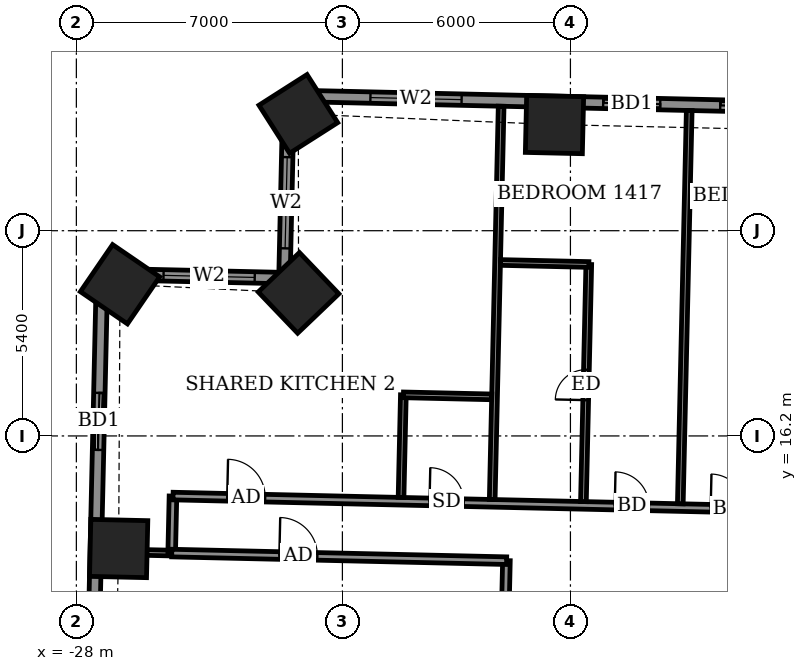
"""IFC4 building model, lengths in metres.
Left out: names, types, materials, properties, quantities, classifications, styles, units other than length and angle.
Written with IfcOpenShell. Run it as: python <this file> out.ifc"""

import sys

from ifc_helpers import new_model, si_unit, direction, frame, frame_2d, origin, origin_2d, place, context, subcontext, project, spatial, rectangle, extrude, element, fill, save


model = new_model("IFC4")
c1 = context("Model", 3, precision=1e-05, world=origin(), true_north=direction((0.0, 1.0)))
c2 = subcontext(c1, "Body", "Model", "MODEL_VIEW")
j1 = project(units=[si_unit("LENGTHUNIT", "METRE"), si_unit("PLANEANGLEUNIT", "RADIAN")], contexts=[c1])
p1 = place(None, origin())
s1 = spatial("IfcSite", under=j1, at=p1, CompositionType="ELEMENT")
p2 = place(p1, origin())
s2 = spatial("IfcBuilding", under=s1, at=p2, CompositionType="ELEMENT")
p3 = place(p2, frame((0.0, 0.0, 60.3)))
s3 = spatial("IfcBuildingStorey", under=s2, at=p3, CompositionType="ELEMENT", Elevation=60.3)
for number, where, z_axis, x_axis in (
    (1, (-15.419, 24.393, -0.55), (0.0, 0.0, 1.0), (-1.0, 0.023, 0.0)),
    (2, (-22.16, 24.673, -0.55), (0.0, 0.0, 1.0), (-0.843, -0.538, 0.0)),
    (3, (-22.154, 19.964, -0.55), (0.0, 0.0, 1.0), (-0.723, -0.691, 0.0)),
    (4, (-26.851, 20.191, -0.55), (0.0, 0.0, 1.0), (-0.565, -0.825, 0.0)),
    (5, (-26.887, 13.238, -0.55), (0.0, 0.0, 1.0), (-0.023, -1.0, 0.0)),
):
    element("IfcColumn", number, at=place(p3, frame(where, z_axis=z_axis, x_axis=x_axis)), inside=s3, PredefinedType="COLUMN", context=c2, shape_type="SweptSolid", body=[
        extrude(rectangle(XDim=1.5, YDim=1.5, at=origin_2d()), origin(), (0.0, 0.0, 1.0), 3.6),
    ])
p4 = place(p3, frame((27.407, 24.021, 0.0), z_axis=(0.0, 0.0, 1.0), x_axis=(-0.99974239923, 0.022696589664, 0.0)))
e6 = element("IfcWall", 6, at=p4, inside=s3, PredefinedType="SOLIDWALL", context=c2, shape_type="SweptSolid", body=[
    extrude(rectangle(XDim=49.836, YDim=0.3, at=frame_2d((24.918, 0.0))), origin(), (0.0, 0.0, 1.0), 3.05),
])
p5 = place(p4, frame((2.871, 0.0, 0.0)))
e7 = element("IfcOpeningElement", 7, at=p5, cuts=e6, PredefinedType="OPENING", context=c2, shape_type="SweptSolid", body=[
    extrude(rectangle(XDim=1.5, YDim=2.4, at=frame_2d((0.75, 1.2))), frame((0.0, 0.16, 0.0), z_axis=(0.0, -1.0, 0.0), x_axis=(1.0, 0.0, 0.0)), (0.0, 0.0, 1.0), 0.32),
])
p6 = place(p4, frame((8.349, 0.0, 0.0)))
e8 = element("IfcOpeningElement", 8, at=p6, cuts=e6, PredefinedType="OPENING", context=c2, shape_type="SweptSolid", body=[
    extrude(rectangle(XDim=1.5, YDim=2.4, at=frame_2d((0.75, 1.2))), frame((0.0, 0.16, 0.0), z_axis=(0.0, -1.0, 0.0), x_axis=(1.0, 0.0, 0.0)), (0.0, 0.0, 1.0), 0.32),
])
p7 = place(p4, frame((11.43, 0.0, 0.0)))
e9 = element("IfcOpeningElement", 9, at=p7, cuts=e6, PredefinedType="OPENING", context=c2, shape_type="SweptSolid", body=[
    extrude(rectangle(XDim=1.5, YDim=2.4, at=frame_2d((0.75, 1.2))), frame((0.0, 0.16, 0.0), z_axis=(0.0, -1.0, 0.0), x_axis=(1.0, 0.0, 0.0)), (0.0, 0.0, 1.0), 0.32),
])
p8 = place(p4, frame((17.236, 0.0, 0.0)))
e10 = element("IfcOpeningElement", 10, at=p8, cuts=e6, PredefinedType="OPENING", context=c2, shape_type="SweptSolid", body=[
    extrude(rectangle(XDim=1.5, YDim=2.4, at=frame_2d((0.75, 1.2))), frame((0.0, 0.16, 0.0), z_axis=(0.0, -1.0, 0.0), x_axis=(1.0, 0.0, 0.0)), (0.0, 0.0, 1.0), 0.32),
])
p9 = place(p4, frame((22.686, 0.0, 0.0)))
e11 = element("IfcOpeningElement", 11, at=p9, cuts=e6, PredefinedType="OPENING", context=c2, shape_type="SweptSolid", body=[
    extrude(rectangle(XDim=1.5, YDim=2.4, at=frame_2d((0.75, 1.2))), frame((0.0, 0.16, 0.0), z_axis=(0.0, -1.0, 0.0), x_axis=(1.0, 0.0, 0.0)), (0.0, 0.0, 1.0), 0.32),
])
p10 = place(p4, frame((25.767, 0.0, 0.0)))
e12 = element("IfcOpeningElement", 12, at=p10, cuts=e6, PredefinedType="OPENING", context=c2, shape_type="SweptSolid", body=[
    extrude(rectangle(XDim=1.5, YDim=2.4, at=frame_2d((0.75, 1.2))), frame((0.0, 0.16, 0.0), z_axis=(0.0, -1.0, 0.0), x_axis=(1.0, 0.0, 0.0)), (0.0, 0.0, 1.0), 0.32),
])
p11 = place(p4, frame((31.211, 0.0, 0.0)))
e13 = element("IfcOpeningElement", 13, at=p11, cuts=e6, PredefinedType="OPENING", context=c2, shape_type="SweptSolid", body=[
    extrude(rectangle(XDim=1.5, YDim=2.4, at=frame_2d((0.75, 1.2))), frame((0.0, 0.16, 0.0), z_axis=(0.0, -1.0, 0.0), x_axis=(1.0, 0.0, 0.0)), (0.0, 0.0, 1.0), 0.32),
])
p12 = place(p4, frame((36.974, 0.0, 0.0)))
e14 = element("IfcOpeningElement", 14, at=p12, cuts=e6, PredefinedType="OPENING", context=c2, shape_type="SweptSolid", body=[
    extrude(rectangle(XDim=1.5, YDim=2.4, at=frame_2d((0.75, 1.2))), frame((0.0, 0.16, 0.0), z_axis=(0.0, -1.0, 0.0), x_axis=(1.0, 0.0, 0.0)), (0.0, 0.0, 1.0), 0.32),
])
p13 = place(p4, frame((40.055, 0.0, 0.0)))
e15 = element("IfcOpeningElement", 15, at=p13, cuts=e6, PredefinedType="OPENING", context=c2, shape_type="SweptSolid", body=[
    extrude(rectangle(XDim=1.5, YDim=2.4, at=frame_2d((0.75, 1.2))), frame((0.0, 0.16, 0.0), z_axis=(0.0, -1.0, 0.0), x_axis=(1.0, 0.0, 0.0)), (0.0, 0.0, 1.0), 0.32),
])
p14 = place(p4, frame((45.282, 0.0, 0.9)))
e16 = element("IfcOpeningElement", 16, at=p14, cuts=e6, PredefinedType="OPENING", context=c2, shape_type="SweptSolid", body=[
    extrude(rectangle(XDim=2.4, YDim=1.5, at=frame_2d((1.2, 0.75))), frame((0.0, 0.16, 0.0), z_axis=(0.0, -1.0, 0.0), x_axis=(1.0, 0.0, 0.0)), (0.0, 0.0, 1.0), 0.32),
])
p15 = place(p3, frame((-22.416, 25.152, 0.0), z_axis=(0.0, 0.0, 1.0), x_axis=(-0.022683280499, -0.999742701292, 0.0)))
e17 = element("IfcWall", 17, at=p15, inside=s3, PredefinedType="SOLIDWALL", context=c2, shape_type="SweptSolid", body=[
    extrude(rectangle(XDim=4.8, YDim=0.3, at=frame_2d((2.4, 0.0))), origin(), (0.0, 0.0, 1.0), 2.55),
])
p16 = place(p15, frame((1.617, 0.0, 0.9)))
e18 = element("IfcOpeningElement", 18, at=p16, cuts=e17, PredefinedType="OPENING", context=c2, shape_type="SweptSolid", body=[
    extrude(rectangle(XDim=2.4, YDim=1.5, at=frame_2d((1.2, 0.75))), frame((0.0, 0.16, 0.0), z_axis=(0.0, -1.0, 0.0), x_axis=(1.0, 0.0, 0.0)), (0.0, 0.0, 1.0), 0.32),
])
p17 = place(p3, frame((-22.525, 20.353, 0.0), z_axis=(0.0, 0.0, 1.0), x_axis=(-0.999742701292, 0.022683280499, 0.0)))
e19 = element("IfcWall", 19, at=p17, inside=s3, PredefinedType="SOLIDWALL", context=c2, shape_type="SweptSolid", body=[
    extrude(rectangle(XDim=4.8, YDim=0.3, at=frame_2d((2.4, 0.0))), origin(), (0.0, 0.0, 1.0), 2.55),
])
p18 = place(p17, frame((0.782, 0.0, 0.9)))
e20 = element("IfcOpeningElement", 20, at=p18, cuts=e19, PredefinedType="OPENING", context=c2, shape_type="SweptSolid", body=[
    extrude(rectangle(XDim=2.4, YDim=1.5, at=frame_2d((1.2, 0.75))), frame((0.0, 0.16, 0.0), z_axis=(0.0, -1.0, 0.0), x_axis=(1.0, 0.0, 0.0)), (0.0, 0.0, 1.0), 0.32),
])
p19 = place(p3, frame((-27.324, 20.462, 0.0), z_axis=(0.0, 0.0, 1.0), x_axis=(-0.022695628174, -0.999742421057, 0.0)))
e21 = element("IfcWall", 21, at=p19, inside=s3, PredefinedType="SOLIDWALL", context=c2, shape_type="SweptSolid", body=[
    extrude(rectangle(XDim=14.63, YDim=0.3, at=frame_2d((7.315, 0.0))), origin(), (0.0, 0.0, 1.0), 3.05),
])
p20 = place(p19, frame((3.13, 0.0, 0.0)))
e22 = element("IfcOpeningElement", 22, at=p20, cuts=e21, PredefinedType="OPENING", context=c2, shape_type="SweptSolid", body=[
    extrude(rectangle(XDim=1.5, YDim=2.4, at=frame_2d((0.75, 1.2))), frame((0.0, 0.16, 0.0), z_axis=(0.0, -1.0, 0.0), x_axis=(1.0, 0.0, 0.0)), (0.0, 0.0, 1.0), 0.32),
])
p21 = place(p19, frame((9.694, 0.0, 0.9)))
e23 = element("IfcOpeningElement", 23, at=p21, cuts=e21, PredefinedType="OPENING", context=c2, shape_type="SweptSolid", body=[
    extrude(rectangle(XDim=2.4, YDim=1.5, at=frame_2d((1.2, 0.75))), frame((0.0, 0.16, 0.0), z_axis=(0.0, -1.0, 0.0), x_axis=(1.0, 0.0, 0.0)), (0.0, 0.0, 1.0), 0.32),
])
p22 = place(p3, frame((-17.287, -13.625, 0.0), z_axis=(0.0, 0.0, 1.0), x_axis=(0.022712214871, 0.999742044377, 0.0)))
e24 = element("IfcWall", 24, at=p22, inside=s3, PredefinedType="PARTITIONING", context=c2, shape_type="SweptSolid", body=[
    extrude(rectangle(XDim=26.551, YDim=0.2, at=frame_2d((13.275, 0.0))), origin(), (0.0, 0.0, 1.0), 3.05),
])
p23 = place(p22, frame((14.15, 0.0, 0.0)))
e25 = element("IfcOpeningElement", 25, at=p23, cuts=e24, PredefinedType="OPENING", context=c2, shape_type="SweptSolid", body=[
    extrude(rectangle(XDim=1.0, YDim=2.1, at=frame_2d((0.5, 1.05))), frame((0.0, 0.11, 0.0), z_axis=(0.0, -1.0, 0.0), x_axis=(1.0, 0.0, 0.0)), (0.0, 0.0, 1.0), 0.22),
])
p24 = place(p22, frame((17.625, 0.0, 0.0)))
e26 = element("IfcOpeningElement", 26, at=p24, cuts=e24, PredefinedType="OPENING", context=c2, shape_type="SweptSolid", body=[
    extrude(rectangle(XDim=0.9, YDim=2.1, at=frame_2d((0.45, 1.05))), frame((0.0, 0.11, 0.0), z_axis=(0.0, -1.0, 0.0), x_axis=(1.0, 0.0, 0.0)), (0.0, 0.0, 1.0), 0.22),
])
p25 = place(p22, frame((9.875, 0.0, 0.0)))
e27 = element("IfcOpeningElement", 27, at=p25, cuts=e24, PredefinedType="OPENING", context=c2, shape_type="SweptSolid", body=[
    extrude(rectangle(XDim=1.0, YDim=2.1, at=frame_2d((0.5, 1.05))), frame((0.0, 0.11, 0.0), z_axis=(0.0, -1.0, 0.0), x_axis=(1.0, 0.0, 0.0)), (0.0, 0.0, 1.0), 0.22),
])
p26 = place(p22, frame((6.475, 0.0, 0.0)))
e28 = element("IfcOpeningElement", 28, at=p26, cuts=e24, PredefinedType="OPENING", context=c2, shape_type="SweptSolid", body=[
    extrude(rectangle(XDim=0.9, YDim=2.1, at=frame_2d((0.45, 1.05))), frame((0.0, 0.11, 0.0), z_axis=(0.0, -1.0, 0.0), x_axis=(1.0, 0.0, 0.0)), (0.0, 0.0, 1.0), 0.22),
])
p27 = place(p22, frame((0.862, 0.0, 0.0)))
e29 = element("IfcOpeningElement", 29, at=p27, cuts=e24, PredefinedType="OPENING", context=c2, shape_type="SweptSolid", body=[
    extrude(rectangle(XDim=1.0, YDim=2.1, at=frame_2d((0.5, 1.05))), frame((0.0, 0.11, 0.0), z_axis=(0.0, -1.0, 0.0), x_axis=(1.0, 0.0, 0.0)), (0.0, 0.0, 1.0), 0.22),
])
p28 = place(p22, frame((3.675, 0.0, 0.0)))
e30 = element("IfcOpeningElement", 30, at=p28, cuts=e24, PredefinedType="OPENING", context=c2, shape_type="SweptSolid", body=[
    extrude(rectangle(XDim=0.9, YDim=2.1, at=frame_2d((0.45, 1.05))), frame((0.0, 0.11, 0.0), z_axis=(0.0, -1.0, 0.0), x_axis=(1.0, 0.0, 0.0)), (0.0, 0.0, 1.0), 0.22),
])
p29 = place(p3, frame((-27.34, 13.16, 0.0), z_axis=(0.0, 0.0, 1.0), x_axis=(0.999743599624, -0.02264365277, 0.0)))
e31 = element("IfcWall", 31, at=p29, inside=s3, PredefinedType="PARTITIONING", context=c2, shape_type="SweptSolid", body=[
    extrude(rectangle(XDim=1.854, YDim=0.15, at=frame_2d((0.927, 0.0))), origin(), (0.0, 0.0, 1.0), 3.05),
])
p30 = place(p3, frame((-25.492, 13.118, 0.0), z_axis=(0.0, 0.0, 1.0), x_axis=(0.022617910375, 0.999744182344, 0.0)))
e32 = element("IfcWall", 32, at=p30, inside=s3, PredefinedType="PARTITIONING", context=c2, shape_type="SweptSolid", body=[
    extrude(rectangle(XDim=1.5, YDim=0.2, at=frame_2d((0.75, 0.0))), origin(), (0.0, 0.0, 1.0), 3.05),
])
p31 = place(p3, frame((-25.49, 13.118, 0.0), z_axis=(0.0, 0.0, 1.0), x_axis=(0.999742607231, -0.02268742575, 0.0)))
e33 = element("IfcWall", 33, at=p31, inside=s3, PredefinedType="PARTITIONING", context=c2, shape_type="SweptSolid", body=[
    extrude(rectangle(XDim=8.813, YDim=0.2, at=frame_2d((4.407, 0.0))), origin(), (0.0, 0.0, 1.0), 3.05),
])
p32 = place(p31, frame((2.832, 0.0, 0.0)))
e34 = element("IfcOpeningElement", 34, at=p32, cuts=e33, PredefinedType="OPENING", context=c2, shape_type="SweptSolid", body=[
    extrude(rectangle(XDim=1.0, YDim=2.1, at=frame_2d((0.5, 1.05))), frame((0.0, 0.11, 0.0), z_axis=(0.0, -1.0, 0.0), x_axis=(1.0, 0.0, 0.0)), (0.0, 0.0, 1.0), 0.22),
])
p33 = place(p3, frame((-25.456, 14.618, 0.0), z_axis=(0.0, 0.0, 1.0), x_axis=(0.999742687583, -0.0226838847, 0.0)))
e35 = element("IfcWall", 35, at=p33, inside=s3, PredefinedType="PARTITIONING", context=c2, shape_type="SweptSolid", body=[
    extrude(rectangle(XDim=54.836, YDim=0.2, at=frame_2d((27.418, 0.0))), origin(), (0.0, 0.0, 1.0), 3.05),
])
p34 = place(p33, frame((52.493, 0.0, 0.0)))
e36 = element("IfcOpeningElement", 36, at=p34, cuts=e35, PredefinedType="OPENING", context=c2, shape_type="SweptSolid", body=[
    extrude(rectangle(XDim=1.0, YDim=2.1, at=frame_2d((0.5, 1.05))), frame((0.0, 0.11, 0.0), z_axis=(0.0, -1.0, 0.0), x_axis=(1.0, 0.0, 0.0)), (0.0, 0.0, 1.0), 0.22),
])
p35 = place(p33, frame((47.25, 0.0, 0.0)))
e37 = element("IfcOpeningElement", 37, at=p35, cuts=e35, PredefinedType="OPENING", context=c2, shape_type="SweptSolid", body=[
    extrude(rectangle(XDim=0.9, YDim=2.1, at=frame_2d((0.45, 1.05))), frame((0.0, 0.11, 0.0), z_axis=(0.0, -1.0, 0.0), x_axis=(1.0, 0.0, 0.0)), (0.0, 0.0, 1.0), 0.22),
])
p36 = place(p33, frame((42.525, 0.0, 0.0)))
e38 = element("IfcOpeningElement", 38, at=p36, cuts=e35, PredefinedType="OPENING", context=c2, shape_type="SweptSolid", body=[
    extrude(rectangle(XDim=0.9, YDim=2.1, at=frame_2d((0.45, 1.05))), frame((0.0, 0.11, 0.0), z_axis=(0.0, -1.0, 0.0), x_axis=(1.0, 0.0, 0.0)), (0.0, 0.0, 1.0), 0.22),
])
p37 = place(p33, frame((40.275, 0.0, 0.0)))
e39 = element("IfcOpeningElement", 39, at=p37, cuts=e35, PredefinedType="OPENING", context=c2, shape_type="SweptSolid", body=[
    extrude(rectangle(XDim=0.9, YDim=2.1, at=frame_2d((0.45, 1.05))), frame((0.0, 0.11, 0.0), z_axis=(0.0, -1.0, 0.0), x_axis=(1.0, 0.0, 0.0)), (0.0, 0.0, 1.0), 0.22),
])
p38 = place(p33, frame((33.0, 0.0, 0.0)))
e40 = element("IfcOpeningElement", 40, at=p38, cuts=e35, PredefinedType="OPENING", context=c2, shape_type="SweptSolid", body=[
    extrude(rectangle(XDim=0.9, YDim=2.1, at=frame_2d((0.45, 1.05))), frame((0.0, 0.11, 0.0), z_axis=(0.0, -1.0, 0.0), x_axis=(1.0, 0.0, 0.0)), (0.0, 0.0, 1.0), 0.22),
])
p39 = place(p33, frame((30.65, 0.0, 0.0)))
e41 = element("IfcOpeningElement", 41, at=p39, cuts=e35, PredefinedType="OPENING", context=c2, shape_type="SweptSolid", body=[
    extrude(rectangle(XDim=0.9, YDim=2.1, at=frame_2d((0.45, 1.05))), frame((0.0, 0.11, 0.0), z_axis=(0.0, -1.0, 0.0), x_axis=(1.0, 0.0, 0.0)), (0.0, 0.0, 1.0), 0.22),
])
p40 = place(p33, frame((23.7, 0.0, 0.0)))
e42 = element("IfcOpeningElement", 42, at=p40, cuts=e35, PredefinedType="OPENING", context=c2, shape_type="SweptSolid", body=[
    extrude(rectangle(XDim=0.9, YDim=2.1, at=frame_2d((0.45, 1.05))), frame((0.0, 0.11, 0.0), z_axis=(0.0, -1.0, 0.0), x_axis=(1.0, 0.0, 0.0)), (0.0, 0.0, 1.0), 0.22),
])
p41 = place(p33, frame((21.425, 0.0, 0.0)))
e43 = element("IfcOpeningElement", 43, at=p41, cuts=e35, PredefinedType="OPENING", context=c2, shape_type="SweptSolid", body=[
    extrude(rectangle(XDim=0.9, YDim=2.1, at=frame_2d((0.45, 1.05))), frame((0.0, 0.11, 0.0), z_axis=(0.0, -1.0, 0.0), x_axis=(1.0, 0.0, 0.0)), (0.0, 0.0, 1.0), 0.22),
])
p42 = place(p33, frame((14.15, 0.0, 0.0)))
e44 = element("IfcOpeningElement", 44, at=p42, cuts=e35, PredefinedType="OPENING", context=c2, shape_type="SweptSolid", body=[
    extrude(rectangle(XDim=0.9, YDim=2.1, at=frame_2d((0.45, 1.05))), frame((0.0, 0.11, 0.0), z_axis=(0.0, -1.0, 0.0), x_axis=(1.0, 0.0, 0.0)), (0.0, 0.0, 1.0), 0.22),
])
p43 = place(p33, frame((11.625, 0.0, 0.0)))
e45 = element("IfcOpeningElement", 45, at=p43, cuts=e35, PredefinedType="OPENING", context=c2, shape_type="SweptSolid", body=[
    extrude(rectangle(XDim=0.9, YDim=2.1, at=frame_2d((0.45, 1.05))), frame((0.0, 0.11, 0.0), z_axis=(0.0, -1.0, 0.0), x_axis=(1.0, 0.0, 0.0)), (0.0, 0.0, 1.0), 0.22),
])
p44 = place(p33, frame((1.425, 0.0, 0.0)))
e46 = element("IfcOpeningElement", 46, at=p44, cuts=e35, PredefinedType="OPENING", context=c2, shape_type="SweptSolid", body=[
    extrude(rectangle(XDim=1.0, YDim=2.1, at=frame_2d((0.5, 1.05))), frame((0.0, 0.11, 0.0), z_axis=(0.0, -1.0, 0.0), x_axis=(1.0, 0.0, 0.0)), (0.0, 0.0, 1.0), 0.22),
])
p45 = place(p33, frame((6.75, 0.0, 0.0)))
e47 = element("IfcOpeningElement", 47, at=p45, cuts=e35, PredefinedType="OPENING", context=c2, shape_type="SweptSolid", body=[
    extrude(rectangle(XDim=0.9, YDim=2.1, at=frame_2d((0.45, 1.05))), frame((0.0, 0.11, 0.0), z_axis=(0.0, -1.0, 0.0), x_axis=(1.0, 0.0, 0.0)), (0.0, 0.0, 1.0), 0.22),
])
p46 = place(p3, frame((-19.457, 14.582, 0.0), z_axis=(0.0, 0.0, 1.0), x_axis=(0.02260842146, 0.999744396973, 0.0)))
e48 = element("IfcWall", 48, at=p46, inside=s3, PredefinedType="PARTITIONING", context=c2, shape_type="SweptSolid", body=[
    extrude(rectangle(XDim=2.7, YDim=0.15, at=frame_2d((1.35, 0.0))), origin(), (0.0, 0.0, 1.0), 3.05),
])
p47 = place(p3, frame((-17.058, 14.527, 0.0), z_axis=(0.0, 0.0, 1.0), x_axis=(0.022714440015, 0.999741993824, 0.0)))
e49 = element("IfcWall", 49, at=p47, inside=s3, PredefinedType="PARTITIONING", context=c2, shape_type="SweptSolid", body=[
    extrude(rectangle(XDim=10.351, YDim=0.15, at=frame_2d((5.175, 0.0))), origin(), (0.0, 0.0, 1.0), 2.55),
])
p48 = place(p3, frame((-14.658, 14.473, 0.0), z_axis=(0.0, 0.0, 1.0), x_axis=(0.022576530581, 0.999745117651, 0.0)))
e50 = element("IfcWall", 50, at=p48, inside=s3, PredefinedType="PARTITIONING", context=c2, shape_type="SweptSolid", body=[
    extrude(rectangle(XDim=6.24, YDim=0.15, at=frame_2d((3.12, 0.0))), origin(), (0.0, 0.0, 1.0), 3.05),
])
p49 = place(p48, frame((2.67, 0.0, 0.0)))
e51 = element("IfcOpeningElement", 51, at=p49, cuts=e50, PredefinedType="OPENING", context=c2, shape_type="SweptSolid", body=[
    extrude(rectangle(XDim=0.8, YDim=2.1, at=frame_2d((0.4, 1.05))), frame((0.0, 0.085, 0.0), z_axis=(0.0, -1.0, 0.0), x_axis=(1.0, 0.0, 0.0)), (0.0, 0.0, 1.0), 0.17),
])
p50 = place(p3, frame((-12.109, 14.415, 0.0), z_axis=(0.0, 0.0, 1.0), x_axis=(0.022690865001, 0.999742529177, 0.0)))
e52 = element("IfcWall", 52, at=p50, inside=s3, PredefinedType="PARTITIONING", context=c2, shape_type="SweptSolid", body=[
    extrude(rectangle(XDim=10.351, YDim=0.15, at=frame_2d((5.175, 0.0))), origin(), (0.0, 0.0, 1.0), 2.55),
])
p51 = place(p3, frame((-19.394, 17.281, 0.0), z_axis=(0.0, 0.0, 1.0), x_axis=(0.999740260747, -0.02279059109, 0.0)))
e53 = element("IfcWall", 53, at=p51, inside=s3, PredefinedType="PARTITIONING", context=c2, shape_type="SweptSolid", body=[
    extrude(rectangle(XDim=2.324, YDim=0.15, at=frame_2d((1.162, 0.0))), origin(), (0.0, 0.0, 1.0), 3.05),
])
p52 = place(p3, frame((-16.839, 20.764, 0.0), z_axis=(0.0, 0.0, 1.0), x_axis=(0.99974031529, -0.022788198363, 0.0)))
e54 = element("IfcWall", 54, at=p52, inside=s3, PredefinedType="PARTITIONING", context=c2, shape_type="SweptSolid", body=[
    extrude(rectangle(XDim=2.325, YDim=0.15, at=frame_2d((1.162, 0.0))), origin(), (0.0, 0.0, 1.0), 3.05),
])
p53 = place(p12, origin())
e55 = element("IfcDoor", 55, at=p53, inside=s3, OperationType="SLIDING_TO_LEFT", PredefinedType="DOOR", context=c2, shape_type="SweptSolid", body=[
    extrude(rectangle(XDim=1.5, YDim=2.4, at=frame_2d((0.75, 1.2))), frame((0.0, 0.025, 0.0), z_axis=(0.0, -1.0, 0.0), x_axis=(1.0, 0.0, 0.0)), (0.0, 0.0, 1.0), 0.05),
])
fill(e14, e55)
p54 = place(p13, origin())
e56 = element("IfcDoor", 56, at=p54, inside=s3, OperationType="SLIDING_TO_LEFT", PredefinedType="DOOR", context=c2, shape_type="SweptSolid", body=[
    extrude(rectangle(XDim=1.5, YDim=2.4, at=frame_2d((0.75, 1.2))), frame((0.0, 0.025, 0.0), z_axis=(0.0, -1.0, 0.0), x_axis=(1.0, 0.0, 0.0)), (0.0, 0.0, 1.0), 0.05),
])
fill(e15, e56)
p55 = place(p14, origin())
e57 = element("IfcWindow", 57, at=p55, inside=s3, PartitioningType="DOUBLE_PANEL_VERTICAL", PredefinedType="WINDOW", context=c2, shape_type="SweptSolid", body=[
    extrude(rectangle(XDim=2.4, YDim=1.5, at=frame_2d((1.2, 0.75))), frame((0.0, 0.03, 0.0), z_axis=(0.0, -1.0, 0.0), x_axis=(1.0, 0.0, 0.0)), (0.0, 0.0, 1.0), 0.06),
])
fill(e16, e57)
p56 = place(p16, origin())
e58 = element("IfcWindow", 58, at=p56, inside=s3, PartitioningType="DOUBLE_PANEL_VERTICAL", PredefinedType="WINDOW", context=c2, shape_type="SweptSolid", body=[
    extrude(rectangle(XDim=2.4, YDim=1.5, at=frame_2d((1.2, 0.75))), frame((0.0, 0.03, 0.0), z_axis=(0.0, -1.0, 0.0), x_axis=(1.0, 0.0, 0.0)), (0.0, 0.0, 1.0), 0.06),
])
fill(e18, e58)
p57 = place(p18, origin())
e59 = element("IfcWindow", 59, at=p57, inside=s3, PartitioningType="DOUBLE_PANEL_VERTICAL", PredefinedType="WINDOW", context=c2, shape_type="SweptSolid", body=[
    extrude(rectangle(XDim=2.4, YDim=1.5, at=frame_2d((1.2, 0.75))), frame((0.0, 0.03, 0.0), z_axis=(0.0, -1.0, 0.0), x_axis=(1.0, 0.0, 0.0)), (0.0, 0.0, 1.0), 0.06),
])
fill(e20, e59)
p58 = place(p20, origin())
e60 = element("IfcDoor", 60, at=p58, inside=s3, OperationType="SLIDING_TO_LEFT", PredefinedType="DOOR", context=c2, shape_type="SweptSolid", body=[
    extrude(rectangle(XDim=1.5, YDim=2.4, at=frame_2d((0.75, 1.2))), frame((0.0, 0.025, 0.0), z_axis=(0.0, -1.0, 0.0), x_axis=(1.0, 0.0, 0.0)), (0.0, 0.0, 1.0), 0.05),
])
fill(e22, e60)
p59 = place(p42, origin())
e61 = element("IfcDoor", 61, at=p59, inside=s3, OperationType="SINGLE_SWING_RIGHT", PredefinedType="DOOR", context=c2, shape_type="SweptSolid", body=[
    extrude(rectangle(XDim=0.9, YDim=2.1, at=frame_2d((0.45, 1.05))), frame((0.0, 0.025, 0.0), z_axis=(0.0, -1.0, 0.0), x_axis=(1.0, 0.0, 0.0)), (0.0, 0.0, 1.0), 0.05),
])
fill(e44, e61)
p60 = place(p43, origin())
e62 = element("IfcDoor", 62, at=p60, inside=s3, OperationType="SINGLE_SWING_LEFT", PredefinedType="DOOR", context=c2, shape_type="SweptSolid", body=[
    extrude(rectangle(XDim=0.9, YDim=2.1, at=frame_2d((0.45, 1.05))), frame((0.0, 0.025, 0.0), z_axis=(0.0, -1.0, 0.0), x_axis=(1.0, 0.0, 0.0)), (0.0, 0.0, 1.0), 0.05),
])
fill(e45, e62)
p61 = place(p49, origin())
e63 = element("IfcDoor", 63, at=p61, inside=s3, OperationType="SINGLE_SWING_LEFT", PredefinedType="DOOR", context=c2, shape_type="SweptSolid", body=[
    extrude(rectangle(XDim=0.8, YDim=2.1, at=frame_2d((0.4, 1.05))), frame((0.0, 0.025, 0.0), z_axis=(0.0, -1.0, 0.0), x_axis=(1.0, 0.0, 0.0)), (0.0, 0.0, 1.0), 0.05),
])
fill(e51, e63)
p62 = place(p44, origin())
e64 = element("IfcDoor", 64, at=p62, inside=s3, OperationType="SINGLE_SWING_RIGHT", PredefinedType="DOOR", context=c2, shape_type="SweptSolid", body=[
    extrude(rectangle(XDim=1.0, YDim=2.1, at=frame_2d((0.5, 1.05))), frame((0.0, 0.025, 0.0), z_axis=(0.0, -1.0, 0.0), x_axis=(1.0, 0.0, 0.0)), (0.0, 0.0, 1.0), 0.05),
])
fill(e46, e64)
p63 = place(p45, origin())
e65 = element("IfcDoor", 65, at=p63, inside=s3, OperationType="SINGLE_SWING_RIGHT", PredefinedType="DOOR", context=c2, shape_type="SweptSolid", body=[
    extrude(rectangle(XDim=0.9, YDim=2.1, at=frame_2d((0.45, 1.05))), frame((0.0, 0.025, 0.0), z_axis=(0.0, -1.0, 0.0), x_axis=(1.0, 0.0, 0.0)), (0.0, 0.0, 1.0), 0.05),
])
fill(e47, e65)
p64 = place(p32, origin())
e66 = element("IfcDoor", 66, at=p64, inside=s3, OperationType="SINGLE_SWING_LEFT", PredefinedType="DOOR", context=c2, shape_type="SweptSolid", body=[
    extrude(rectangle(XDim=1.0, YDim=2.1, at=frame_2d((0.5, 1.05))), frame((0.0, 0.025, 0.0), z_axis=(0.0, -1.0, 0.0), x_axis=(1.0, 0.0, 0.0)), (0.0, 0.0, 1.0), 0.05),
])
fill(e34, e66)
save(model, sys.argv[1])
